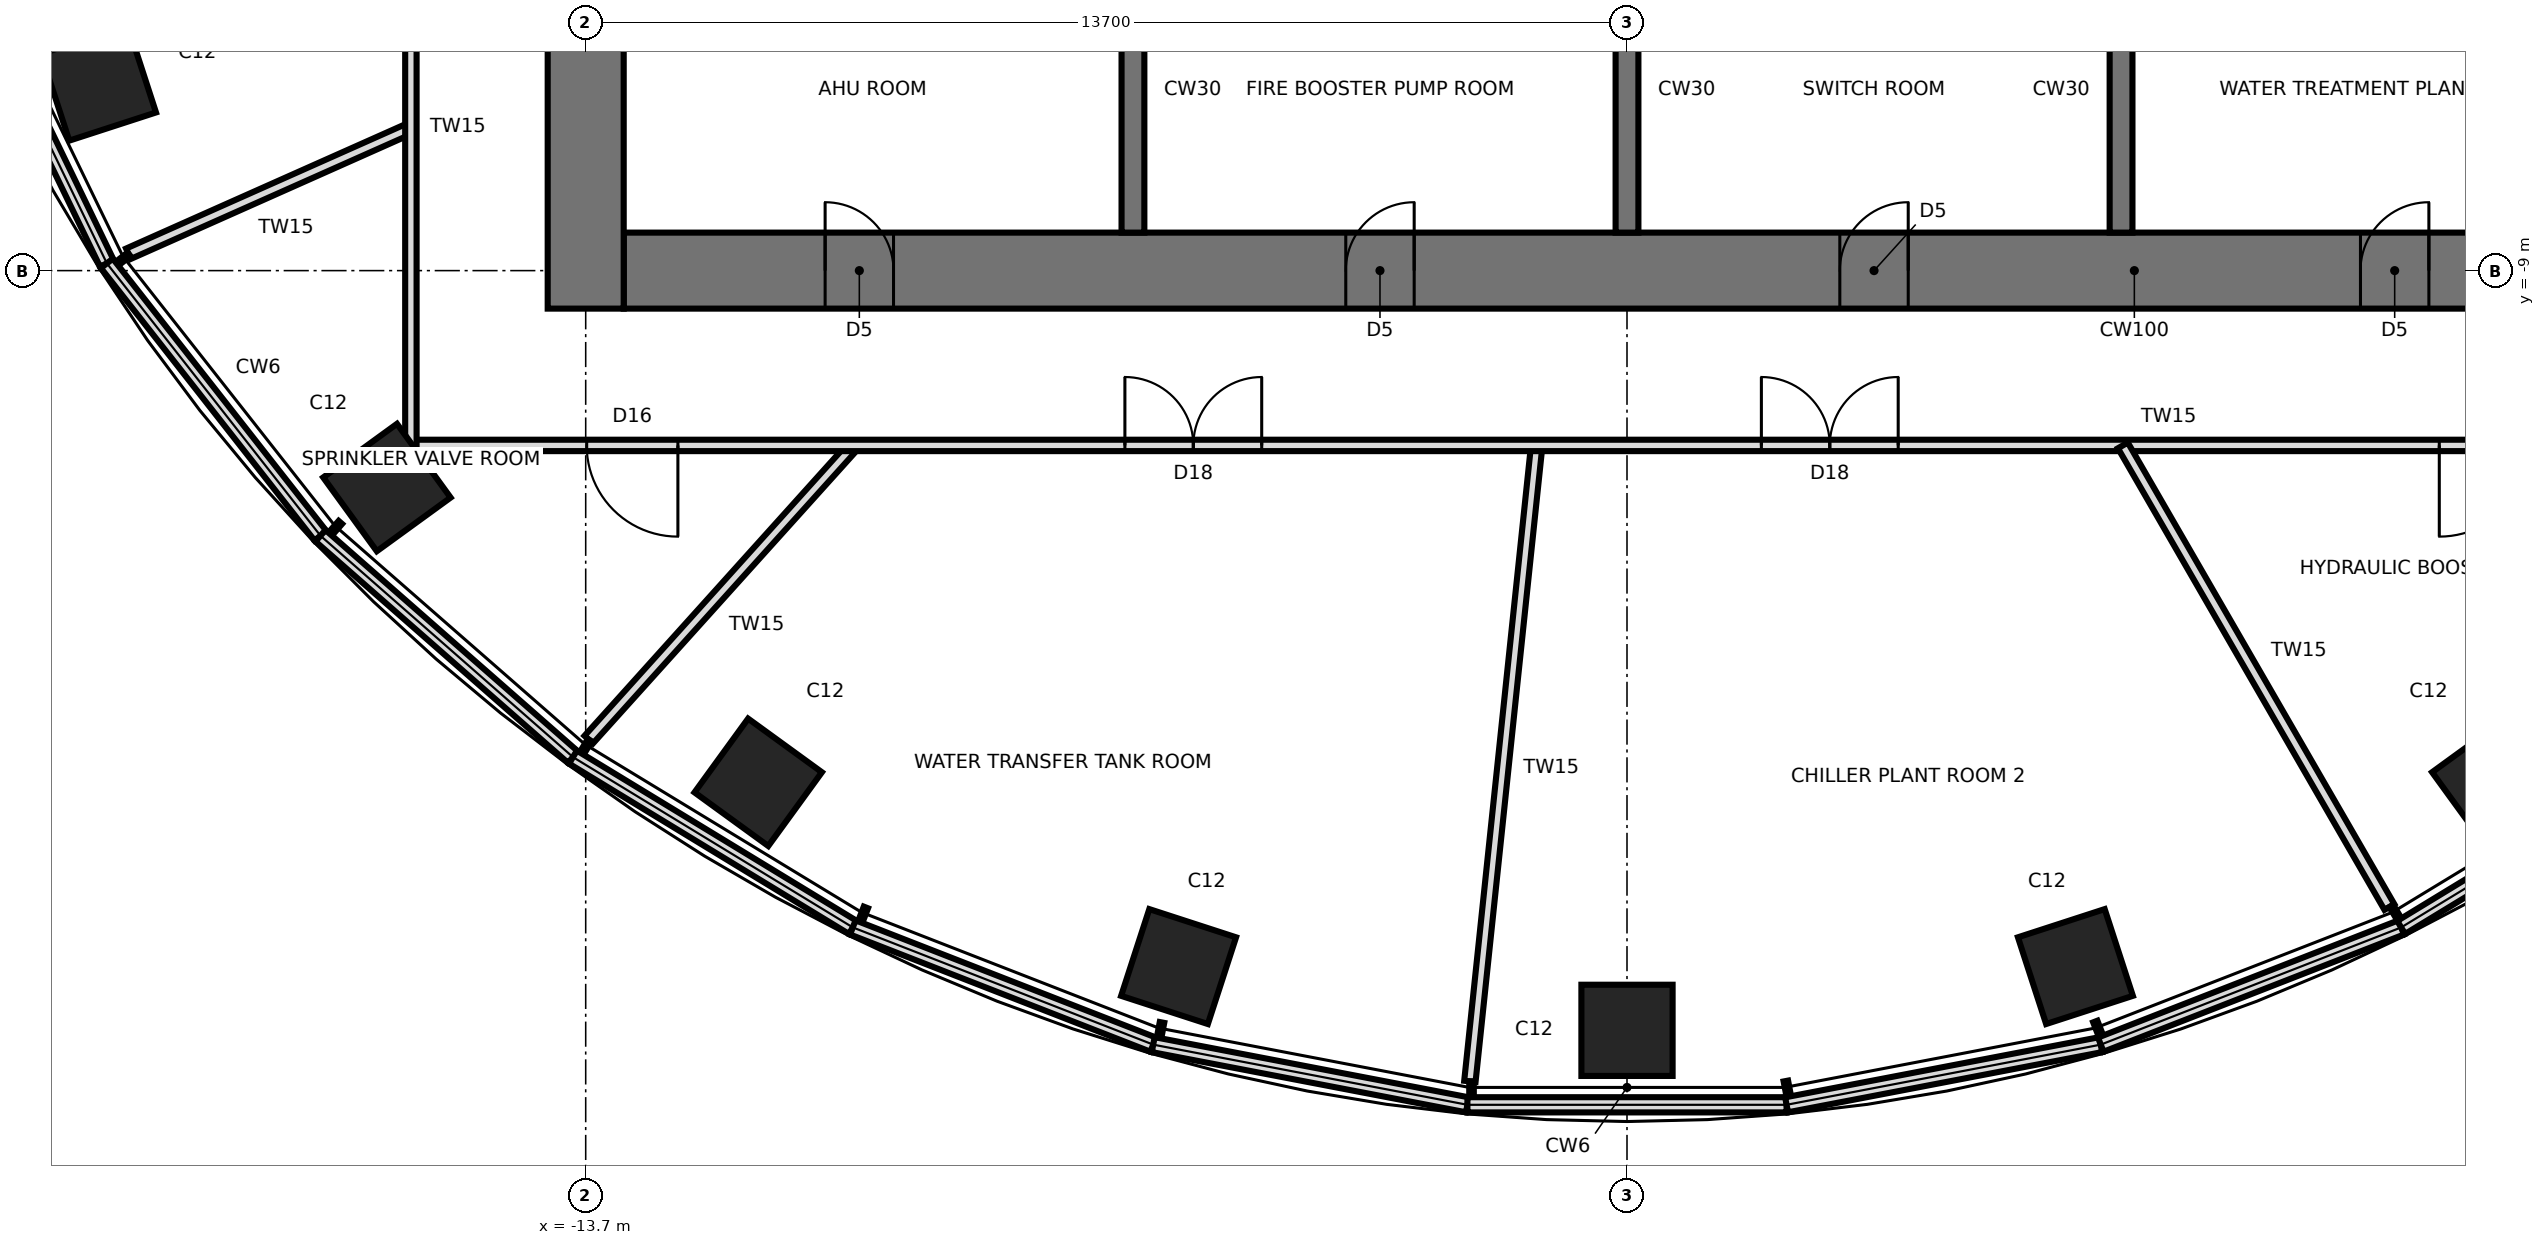
"""IFC4 building model, lengths in metres.
Left out: names, types, materials, properties, quantities, classifications, styles, units other than length and angle.
Written with IfcOpenShell. Run it as: python <this file> out.ifc"""

import sys

from ifc_helpers import new_model, si_unit, direction, frame, frame_2d, origin, origin_2d, place, context, subcontext, project, spatial, rectangle, extrude, element, fill, save


model = new_model("IFC4")
c1 = context("Model", 3, precision=1e-05, world=origin(), true_north=direction((0.0, 1.0)))
c2 = subcontext(c1, "Body", "Model", "MODEL_VIEW")
j1 = project(units=[si_unit("LENGTHUNIT", "METRE"), si_unit("PLANEANGLEUNIT", "RADIAN")], contexts=[c1])
p1 = place(None, origin())
s1 = spatial("IfcSite", under=j1, at=p1, CompositionType="ELEMENT")
p2 = place(p1, origin())
s2 = spatial("IfcBuilding", under=s1, at=p2, CompositionType="ELEMENT")
p3 = place(p2, frame((0.0, 0.0, 277.0)))
s3 = spatial("IfcBuildingStorey", under=s2, at=p3, CompositionType="ELEMENT", Elevation=277.0)
for number, where, z_axis, x_axis in (
    (1, (-20.109, -6.534, 0.0), (0.0, 0.0, 1.0), (-0.951, -0.309, 0.0)),
    (2, (-16.315, -11.854, 0.0), (0.0, 0.0, 1.0), (-0.809, -0.588, 0.0)),
    (3, (-11.43, -15.733, 0.0), (0.0, 0.0, 1.0), (-0.588, -0.809, 0.0)),
    (4, (-5.9, -18.157, 0.0), (0.0, 0.0, 1.0), (-0.309, -0.951, 0.0)),
    (5, (0.0, -18.996, 0.0), (0.0, 0.0, 1.0), (0.0, -1.0, 0.0)),
    (6, (5.9, -18.157, 0.0), (0.0, 0.0, 1.0), (0.309, -0.951, 0.0)),
    (7, (11.43, -15.733, 0.0), (0.0, 0.0, 1.0), (0.588, -0.809, 0.0)),
):
    element("IfcColumn", number, at=place(p3, frame(where, z_axis=z_axis, x_axis=x_axis)), inside=s3, PredefinedType="COLUMN", context=c2, shape_type="SweptSolid", body=[
        extrude(rectangle(XDim=1.2, YDim=1.2, at=origin_2d()), origin(), (0.0, 0.0, 1.0), 5.0),
    ])
p4 = place(p3, frame((-13.2, -9.0, 0.0), z_axis=(0.0, 0.0, 1.0), x_axis=(1.0, 0.0, 0.0)))
e8 = element("IfcWall", 8, at=p4, inside=s3, PredefinedType="SHEAR", context=c2, shape_type="SweptSolid", body=[
    extrude(rectangle(XDim=26.4, YDim=1.0, at=frame_2d((13.2, 0.0))), origin(), (0.0, 0.0, 1.0), 5.0),
])
p5 = place(p4, frame((2.65, 0.0, 0.0)))
e9 = element("IfcOpeningElement", 9, at=p5, cuts=e8, PredefinedType="OPENING", context=c2, shape_type="SweptSolid", body=[
    extrude(rectangle(XDim=0.9, YDim=2.1, at=frame_2d((0.45, 1.05))), frame((0.0, 0.51, 0.0), z_axis=(0.0, -1.0, 0.0), x_axis=(1.0, 0.0, 0.0)), (0.0, 0.0, 1.0), 1.02),
])
p6 = place(p4, frame((9.5, 0.0, 0.0)))
e10 = element("IfcOpeningElement", 10, at=p6, cuts=e8, PredefinedType="OPENING", context=c2, shape_type="SweptSolid", body=[
    extrude(rectangle(XDim=0.9, YDim=2.1, at=frame_2d((0.45, 1.05))), frame((0.0, 0.51, 0.0), z_axis=(0.0, -1.0, 0.0), x_axis=(1.0, 0.0, 0.0)), (0.0, 0.0, 1.0), 1.02),
])
p7 = place(p4, frame((16.0, 0.0, 0.0)))
e11 = element("IfcOpeningElement", 11, at=p7, cuts=e8, PredefinedType="OPENING", context=c2, shape_type="SweptSolid", body=[
    extrude(rectangle(XDim=0.9, YDim=2.1, at=frame_2d((0.45, 1.05))), frame((0.0, 0.51, 0.0), z_axis=(0.0, -1.0, 0.0), x_axis=(1.0, 0.0, 0.0)), (0.0, 0.0, 1.0), 1.02),
])
p8 = place(p4, frame((22.85, 0.0, 0.0)))
e12 = element("IfcOpeningElement", 12, at=p8, cuts=e8, PredefinedType="OPENING", context=c2, shape_type="SweptSolid", body=[
    extrude(rectangle(XDim=0.9, YDim=2.1, at=frame_2d((0.45, 1.05))), frame((0.0, 0.51, 0.0), z_axis=(0.0, -1.0, 0.0), x_axis=(1.0, 0.0, 0.0)), (0.0, 0.0, 1.0), 1.02),
])
p9 = place(p3, frame((-13.7, 9.5, 0.0), z_axis=(0.0, 0.0, 1.0), x_axis=(0.0, -1.0, 0.0)))
e13 = element("IfcWall", 13, at=p9, inside=s3, PredefinedType="SHEAR", context=c2, shape_type="SweptSolid", body=[
    extrude(rectangle(XDim=19.0, YDim=1.0, at=frame_2d((9.5, 0.0))), origin(), (0.0, 0.0, 1.0), 5.0),
])
p10 = place(p9, frame((8.6, 0.0, 0.0)))
e14 = element("IfcOpeningElement", 14, at=p10, cuts=e13, PredefinedType="OPENING", context=c2, shape_type="SweptSolid", body=[
    extrude(rectangle(XDim=1.8, YDim=2.4, at=frame_2d((0.9, 1.2))), frame((0.0, 0.51, 0.0), z_axis=(0.0, -1.0, 0.0), x_axis=(1.0, 0.0, 0.0)), (0.0, 0.0, 1.0), 1.02),
])
for number, where, z_axis, x_axis in (
    (15, (-6.5, -4.75, 0.0), (0.0, 0.0, 1.0), (0.0, -1.0, 0.0)),
    (16, (6.5, -4.75, 0.0), (0.0, 0.0, 1.0), (0.0, -1.0, 0.0)),
    (17, (0.0, -4.75, 0.0), (0.0, 0.0, 1.0), (0.0, -1.0, 0.0)),
):
    element("IfcWall", number, at=place(p3, frame(where, z_axis=z_axis, x_axis=x_axis)), inside=s3, PredefinedType="SHEAR", context=c2, shape_type="SweptSolid", body=[
        extrude(rectangle(XDim=3.75, YDim=0.3, at=frame_2d((1.875, 0.0))), origin(), (0.0, 0.0, 1.0), 5.0),
    ])
p11 = place(p3, frame((-22.04, -4.685, 5.0), z_axis=(0.0, 0.0, 1.0), x_axis=(0.43525592316, -0.900306770692, 0.0)))
e18 = element("IfcWall", 18, at=p11, inside=s3, PredefinedType="PARAPET", context=c2, shape_type="SweptSolid", body=[
    extrude(rectangle(XDim=4.687, YDim=0.2, at=frame_2d((2.344, 0.0))), origin(), (0.0, 0.0, 1.0), 0.4),
])
p12 = place(p3, frame((-20.0, -8.905, 5.0), z_axis=(0.0, 0.0, 1.0), x_axis=(0.617115858167, -0.786872300694, 0.0)))
e19 = element("IfcWall", 19, at=p12, inside=s3, PredefinedType="PARAPET", context=c2, shape_type="SweptSolid", body=[
    extrude(rectangle(XDim=4.555, YDim=0.2, at=frame_2d((2.277, 0.0))), origin(), (0.0, 0.0, 1.0), 0.4),
])
p13 = place(p3, frame((-17.189, -12.489, 5.0), z_axis=(0.0, 0.0, 1.0), x_axis=(0.751898477354, -0.659278908925, 0.0)))
e20 = element("IfcWall", 20, at=p13, inside=s3, PredefinedType="PARAPET", context=c2, shape_type="SweptSolid", body=[
    extrude(rectangle(XDim=4.418, YDim=0.2, at=frame_2d((2.209, 0.0))), origin(), (0.0, 0.0, 1.0), 0.4),
])
p14 = place(p3, frame((-13.867, -15.401, 5.0), z_axis=(0.0, 0.0, 1.0), x_axis=(0.854217149251, -0.519916398977, 0.0)))
e21 = element("IfcWall", 21, at=p14, inside=s3, PredefinedType="PARAPET", context=c2, shape_type="SweptSolid", body=[
    extrude(rectangle(XDim=4.31, YDim=0.2, at=frame_2d((2.155, 0.0))), origin(), (0.0, 0.0, 1.0), 0.4),
])
p15 = place(p3, frame((-10.186, -17.642, 5.0), z_axis=(0.0, 0.0, 1.0), x_axis=(0.931602336342, -0.363479142348, 0.0)))
e22 = element("IfcWall", 22, at=p15, inside=s3, PredefinedType="PARAPET", context=c2, shape_type="SweptSolid", body=[
    extrude(rectangle(XDim=4.242, YDim=0.2, at=frame_2d((2.121, 0.0))), origin(), (0.0, 0.0, 1.0), 0.4),
])
p16 = place(p3, frame((-6.233, -19.184, 5.0), z_axis=(0.0, 0.0, 1.0), x_axis=(0.982147668134, -0.188111557274, 0.0)))
e23 = element("IfcWall", 23, at=p16, inside=s3, PredefinedType="PARAPET", context=c2, shape_type="SweptSolid", body=[
    extrude(rectangle(XDim=4.209, YDim=0.2, at=frame_2d((2.104, 0.0))), origin(), (0.0, 0.0, 1.0), 0.4),
])
p17 = place(p3, frame((-2.1, -19.976, 5.0), z_axis=(0.0, 0.0, 1.0), x_axis=(1.0, 0.0, 0.0)))
e24 = element("IfcWall", 24, at=p17, inside=s3, PredefinedType="PARAPET", context=c2, shape_type="SweptSolid", body=[
    extrude(rectangle(XDim=4.199, YDim=0.2, at=frame_2d((2.1, 0.0))), origin(), (0.0, 0.0, 1.0), 0.4),
])
p18 = place(p3, frame((2.1, -19.976, 5.0), z_axis=(0.0, 0.0, 1.0), x_axis=(0.982147668134, 0.188111557274, 0.0)))
e25 = element("IfcWall", 25, at=p18, inside=s3, PredefinedType="PARAPET", context=c2, shape_type="SweptSolid", body=[
    extrude(rectangle(XDim=4.209, YDim=0.2, at=frame_2d((2.104, 0.0))), origin(), (0.0, 0.0, 1.0), 0.4),
])
p19 = place(p3, frame((6.233, -19.184, 5.0), z_axis=(0.0, 0.0, 1.0), x_axis=(0.931602336342, 0.363479142348, 0.0)))
e26 = element("IfcWall", 26, at=p19, inside=s3, PredefinedType="PARAPET", context=c2, shape_type="SweptSolid", body=[
    extrude(rectangle(XDim=4.242, YDim=0.2, at=frame_2d((2.121, 0.0))), origin(), (0.0, 0.0, 1.0), 0.4),
])
p20 = place(p3, frame((10.186, -17.642, 5.0), z_axis=(0.0, 0.0, 1.0), x_axis=(0.854217149251, 0.519916398977, 0.0)))
e27 = element("IfcWall", 27, at=p20, inside=s3, PredefinedType="PARAPET", context=c2, shape_type="SweptSolid", body=[
    extrude(rectangle(XDim=4.31, YDim=0.2, at=frame_2d((2.155, 0.0))), origin(), (0.0, 0.0, 1.0), 0.4),
])
p21 = place(p3, frame((-16.0, -7.124, 0.0), z_axis=(0.0, 0.0, 1.0), x_axis=(-0.91357135451, -0.406678472774, 0.0)))
e28 = element("IfcWall", 28, at=p21, inside=s3, PredefinedType="PARTITIONING", context=c2, shape_type="SweptSolid", body=[
    extrude(rectangle(XDim=4.068, YDim=0.15, at=frame_2d((2.034, 0.0))), origin(), (0.0, 0.0, 1.0), 4.75),
])
p22 = place(p3, frame((-10.175, -11.3, 0.0), z_axis=(0.0, 0.0, 1.0), x_axis=(-0.669133036405, -0.743142637447, 0.0)))
e29 = element("IfcWall", 29, at=p22, inside=s3, PredefinedType="PARTITIONING", context=c2, shape_type="SweptSolid", body=[
    extrude(rectangle(XDim=5.209, YDim=0.15, at=frame_2d((2.604, 0.0))), origin(), (0.0, 0.0, 1.0), 4.75),
])
p23 = place(p3, frame((-1.188, -11.3, 0.0), z_axis=(0.0, 0.0, 1.0), x_axis=(-0.104521648153, -0.994522611642, 0.0)))
e30 = element("IfcWall", 30, at=p23, inside=s3, PredefinedType="PARTITIONING", context=c2, shape_type="SweptSolid", body=[
    extrude(rectangle(XDim=8.414, YDim=0.15, at=frame_2d((4.207, 0.0))), origin(), (0.0, 0.0, 1.0), 4.75),
])
p24 = place(p3, frame((-16.0, -11.3, 0.0), z_axis=(0.0, 0.0, 1.0), x_axis=(1.0, 0.0, 0.0)))
e31 = element("IfcWall", 31, at=p24, inside=s3, PredefinedType="PARTITIONING", context=c2, shape_type="SweptSolid", body=[
    extrude(rectangle(XDim=32.0, YDim=0.15, at=frame_2d((16.0, 0.0))), origin(), (0.0, 0.0, 1.0), 4.75),
])
p25 = place(p24, frame((2.313, 0.0, 0.0)))
e32 = element("IfcOpeningElement", 32, at=p25, cuts=e31, PredefinedType="OPENING", context=c2, shape_type="SweptSolid", body=[
    extrude(rectangle(XDim=1.2, YDim=2.1, at=frame_2d((0.6, 1.05))), frame((0.0, 0.085, 0.0), z_axis=(0.0, -1.0, 0.0), x_axis=(1.0, 0.0, 0.0)), (0.0, 0.0, 1.0), 0.17),
])
p26 = place(p24, frame((9.394, 0.0, 0.0)))
e33 = element("IfcOpeningElement", 33, at=p26, cuts=e31, PredefinedType="OPENING", context=c2, shape_type="SweptSolid", body=[
    extrude(rectangle(XDim=1.8, YDim=2.4, at=frame_2d((0.9, 1.2))), frame((0.0, 0.085, 0.0), z_axis=(0.0, -1.0, 0.0), x_axis=(1.0, 0.0, 0.0)), (0.0, 0.0, 1.0), 0.17),
])
p27 = place(p24, frame((17.768, 0.0, 0.0)))
e34 = element("IfcOpeningElement", 34, at=p27, cuts=e31, PredefinedType="OPENING", context=c2, shape_type="SweptSolid", body=[
    extrude(rectangle(XDim=1.8, YDim=2.4, at=frame_2d((0.9, 1.2))), frame((0.0, 0.085, 0.0), z_axis=(0.0, -1.0, 0.0), x_axis=(1.0, 0.0, 0.0)), (0.0, 0.0, 1.0), 0.17),
])
p28 = place(p24, frame((26.687, 0.0, 0.0)))
e35 = element("IfcOpeningElement", 35, at=p28, cuts=e31, PredefinedType="OPENING", context=c2, shape_type="SweptSolid", body=[
    extrude(rectangle(XDim=1.2, YDim=2.1, at=frame_2d((0.6, 1.05))), frame((0.0, 0.085, 0.0), z_axis=(0.0, -1.0, 0.0), x_axis=(1.0, 0.0, 0.0)), (0.0, 0.0, 1.0), 0.17),
])
p29 = place(p3, frame((6.524, -11.3, 0.0), z_axis=(0.0, 0.0, 1.0), x_axis=(0.4999806097, -0.86603659849, 0.0)))
e36 = element("IfcWall", 36, at=p29, inside=s3, PredefinedType="PARTITIONING", context=c2, shape_type="SweptSolid", body=[
    extrude(rectangle(XDim=7.013, YDim=0.15, at=frame_2d((3.506, 0.0))), origin(), (0.0, 0.0, 1.0), 4.75),
])
p30 = place(p3, frame((-16.0, 11.3, 0.0), z_axis=(0.0, 0.0, 1.0), x_axis=(0.0, -1.0, 0.0)))
e37 = element("IfcWall", 37, at=p30, inside=s3, PredefinedType="PARTITIONING", context=c2, shape_type="SweptSolid", body=[
    extrude(rectangle(XDim=22.6, YDim=0.15, at=frame_2d((11.3, 0.0))), origin(), (0.0, 0.0, 1.0), 4.75),
])
p31 = place(p30, frame((5.438, 0.0, 0.0)))
e38 = element("IfcOpeningElement", 38, at=p31, cuts=e37, PredefinedType="OPENING", context=c2, shape_type="SweptSolid", body=[
    extrude(rectangle(XDim=1.2, YDim=2.1, at=frame_2d((0.6, 1.05))), frame((0.0, 0.085, 0.0), z_axis=(0.0, -1.0, 0.0), x_axis=(1.0, 0.0, 0.0)), (0.0, 0.0, 1.0), 0.17),
])
p32 = place(p30, frame((12.261, 0.0, 0.0)))
e39 = element("IfcOpeningElement", 39, at=p32, cuts=e37, PredefinedType="OPENING", context=c2, shape_type="SweptSolid", body=[
    extrude(rectangle(XDim=1.8, YDim=2.4, at=frame_2d((0.9, 1.2))), frame((0.0, 0.085, 0.0), z_axis=(0.0, -1.0, 0.0), x_axis=(1.0, 0.0, 0.0)), (0.0, 0.0, 1.0), 0.17),
])
p33 = place(p5, origin())
e40 = element("IfcDoor", 40, at=p33, inside=s3, OperationType="SINGLE_SWING_LEFT", PredefinedType="DOOR", context=c2, shape_type="SweptSolid", body=[
    extrude(rectangle(XDim=0.82, YDim=2.06, at=frame_2d((0.45, 1.03))), frame((0.0, 0.025, 0.0), z_axis=(0.0, -1.0, 0.0), x_axis=(1.0, 0.0, 0.0)), (0.0, 0.0, 1.0), 0.05),
    extrude(rectangle(XDim=0.04, YDim=2.1, at=frame_2d((0.02, 1.05))), frame((0.0, 0.25, 0.0), z_axis=(0.0, -1.0, 0.0), x_axis=(1.0, 0.0, 0.0)), (0.0, 0.0, 1.0), 0.5),
    extrude(rectangle(XDim=0.04, YDim=2.1, at=frame_2d((0.88, 1.05))), frame((0.0, 0.25, 0.0), z_axis=(0.0, -1.0, 0.0), x_axis=(1.0, 0.0, 0.0)), (0.0, 0.0, 1.0), 0.5),
    extrude(rectangle(XDim=0.82, YDim=0.04, at=frame_2d((0.45, 2.08))), frame((0.0, 0.25, 0.0), z_axis=(0.0, -1.0, 0.0), x_axis=(1.0, 0.0, 0.0)), (0.0, 0.0, 1.0), 0.5),
])
fill(e9, e40)
p34 = place(p6, origin())
e41 = element("IfcDoor", 41, at=p34, inside=s3, OperationType="SINGLE_SWING_RIGHT", PredefinedType="DOOR", context=c2, shape_type="SweptSolid", body=[
    extrude(rectangle(XDim=0.82, YDim=2.06, at=frame_2d((0.45, 1.03))), frame((0.0, 0.025, 0.0), z_axis=(0.0, -1.0, 0.0), x_axis=(1.0, 0.0, 0.0)), (0.0, 0.0, 1.0), 0.05),
    extrude(rectangle(XDim=0.04, YDim=2.1, at=frame_2d((0.02, 1.05))), frame((0.0, 0.25, 0.0), z_axis=(0.0, -1.0, 0.0), x_axis=(1.0, 0.0, 0.0)), (0.0, 0.0, 1.0), 0.5),
    extrude(rectangle(XDim=0.04, YDim=2.1, at=frame_2d((0.88, 1.05))), frame((0.0, 0.25, 0.0), z_axis=(0.0, -1.0, 0.0), x_axis=(1.0, 0.0, 0.0)), (0.0, 0.0, 1.0), 0.5),
    extrude(rectangle(XDim=0.82, YDim=0.04, at=frame_2d((0.45, 2.08))), frame((0.0, 0.25, 0.0), z_axis=(0.0, -1.0, 0.0), x_axis=(1.0, 0.0, 0.0)), (0.0, 0.0, 1.0), 0.5),
])
fill(e10, e41)
p35 = place(p7, origin())
e42 = element("IfcDoor", 42, at=p35, inside=s3, OperationType="SINGLE_SWING_RIGHT", PredefinedType="DOOR", context=c2, shape_type="SweptSolid", body=[
    extrude(rectangle(XDim=0.82, YDim=2.06, at=frame_2d((0.45, 1.03))), frame((0.0, 0.025, 0.0), z_axis=(0.0, -1.0, 0.0), x_axis=(1.0, 0.0, 0.0)), (0.0, 0.0, 1.0), 0.05),
    extrude(rectangle(XDim=0.04, YDim=2.1, at=frame_2d((0.02, 1.05))), frame((0.0, 0.25, 0.0), z_axis=(0.0, -1.0, 0.0), x_axis=(1.0, 0.0, 0.0)), (0.0, 0.0, 1.0), 0.5),
    extrude(rectangle(XDim=0.04, YDim=2.1, at=frame_2d((0.88, 1.05))), frame((0.0, 0.25, 0.0), z_axis=(0.0, -1.0, 0.0), x_axis=(1.0, 0.0, 0.0)), (0.0, 0.0, 1.0), 0.5),
    extrude(rectangle(XDim=0.82, YDim=0.04, at=frame_2d((0.45, 2.08))), frame((0.0, 0.25, 0.0), z_axis=(0.0, -1.0, 0.0), x_axis=(1.0, 0.0, 0.0)), (0.0, 0.0, 1.0), 0.5),
])
fill(e11, e42)
p36 = place(p8, origin())
e43 = element("IfcDoor", 43, at=p36, inside=s3, OperationType="SINGLE_SWING_RIGHT", PredefinedType="DOOR", context=c2, shape_type="SweptSolid", body=[
    extrude(rectangle(XDim=0.82, YDim=2.06, at=frame_2d((0.45, 1.03))), frame((0.0, 0.025, 0.0), z_axis=(0.0, -1.0, 0.0), x_axis=(1.0, 0.0, 0.0)), (0.0, 0.0, 1.0), 0.05),
    extrude(rectangle(XDim=0.04, YDim=2.1, at=frame_2d((0.02, 1.05))), frame((0.0, 0.25, 0.0), z_axis=(0.0, -1.0, 0.0), x_axis=(1.0, 0.0, 0.0)), (0.0, 0.0, 1.0), 0.5),
    extrude(rectangle(XDim=0.04, YDim=2.1, at=frame_2d((0.88, 1.05))), frame((0.0, 0.25, 0.0), z_axis=(0.0, -1.0, 0.0), x_axis=(1.0, 0.0, 0.0)), (0.0, 0.0, 1.0), 0.5),
    extrude(rectangle(XDim=0.82, YDim=0.04, at=frame_2d((0.45, 2.08))), frame((0.0, 0.25, 0.0), z_axis=(0.0, -1.0, 0.0), x_axis=(1.0, 0.0, 0.0)), (0.0, 0.0, 1.0), 0.5),
])
fill(e12, e43)
p37 = place(p25, frame((1.2, 0.0, 0.0), z_axis=(0.0, 0.0, 1.0), x_axis=(-1.0, 0.0, 0.0)))
e44 = element("IfcDoor", 44, at=p37, inside=s3, OperationType="SINGLE_SWING_LEFT", PredefinedType="DOOR", context=c2, shape_type="SweptSolid", body=[
    extrude(rectangle(XDim=1.2, YDim=2.1, at=frame_2d((0.6, 1.05))), frame((0.0, 0.025, 0.0), z_axis=(0.0, -1.0, 0.0), x_axis=(1.0, 0.0, 0.0)), (0.0, 0.0, 1.0), 0.05),
])
fill(e32, e44)
p38 = place(p26, origin())
e45 = element("IfcDoor", 45, at=p38, inside=s3, OperationType="DOUBLE_DOOR_SINGLE_SWING", PredefinedType="DOOR", context=c2, shape_type="SweptSolid", body=[
    extrude(rectangle(XDim=1.8, YDim=2.4, at=frame_2d((0.9, 1.2))), frame((0.0, 0.025, 0.0), z_axis=(0.0, -1.0, 0.0), x_axis=(1.0, 0.0, 0.0)), (0.0, 0.0, 1.0), 0.05),
])
fill(e33, e45)
p39 = place(p27, origin())
e46 = element("IfcDoor", 46, at=p39, inside=s3, OperationType="DOUBLE_DOOR_SINGLE_SWING", PredefinedType="DOOR", context=c2, shape_type="SweptSolid", body=[
    extrude(rectangle(XDim=1.8, YDim=2.4, at=frame_2d((0.9, 1.2))), frame((0.0, 0.025, 0.0), z_axis=(0.0, -1.0, 0.0), x_axis=(1.0, 0.0, 0.0)), (0.0, 0.0, 1.0), 0.05),
])
fill(e34, e46)
p40 = place(p28, frame((1.2, 0.0, 0.0), z_axis=(0.0, 0.0, 1.0), x_axis=(-1.0, 0.0, 0.0)))
e47 = element("IfcDoor", 47, at=p40, inside=s3, OperationType="SINGLE_SWING_RIGHT", PredefinedType="DOOR", context=c2, shape_type="SweptSolid", body=[
    extrude(rectangle(XDim=1.2, YDim=2.1, at=frame_2d((0.6, 1.05))), frame((0.0, 0.025, 0.0), z_axis=(0.0, -1.0, 0.0), x_axis=(1.0, 0.0, 0.0)), (0.0, 0.0, 1.0), 0.05),
])
fill(e35, e47)
save(model, sys.argv[1])
